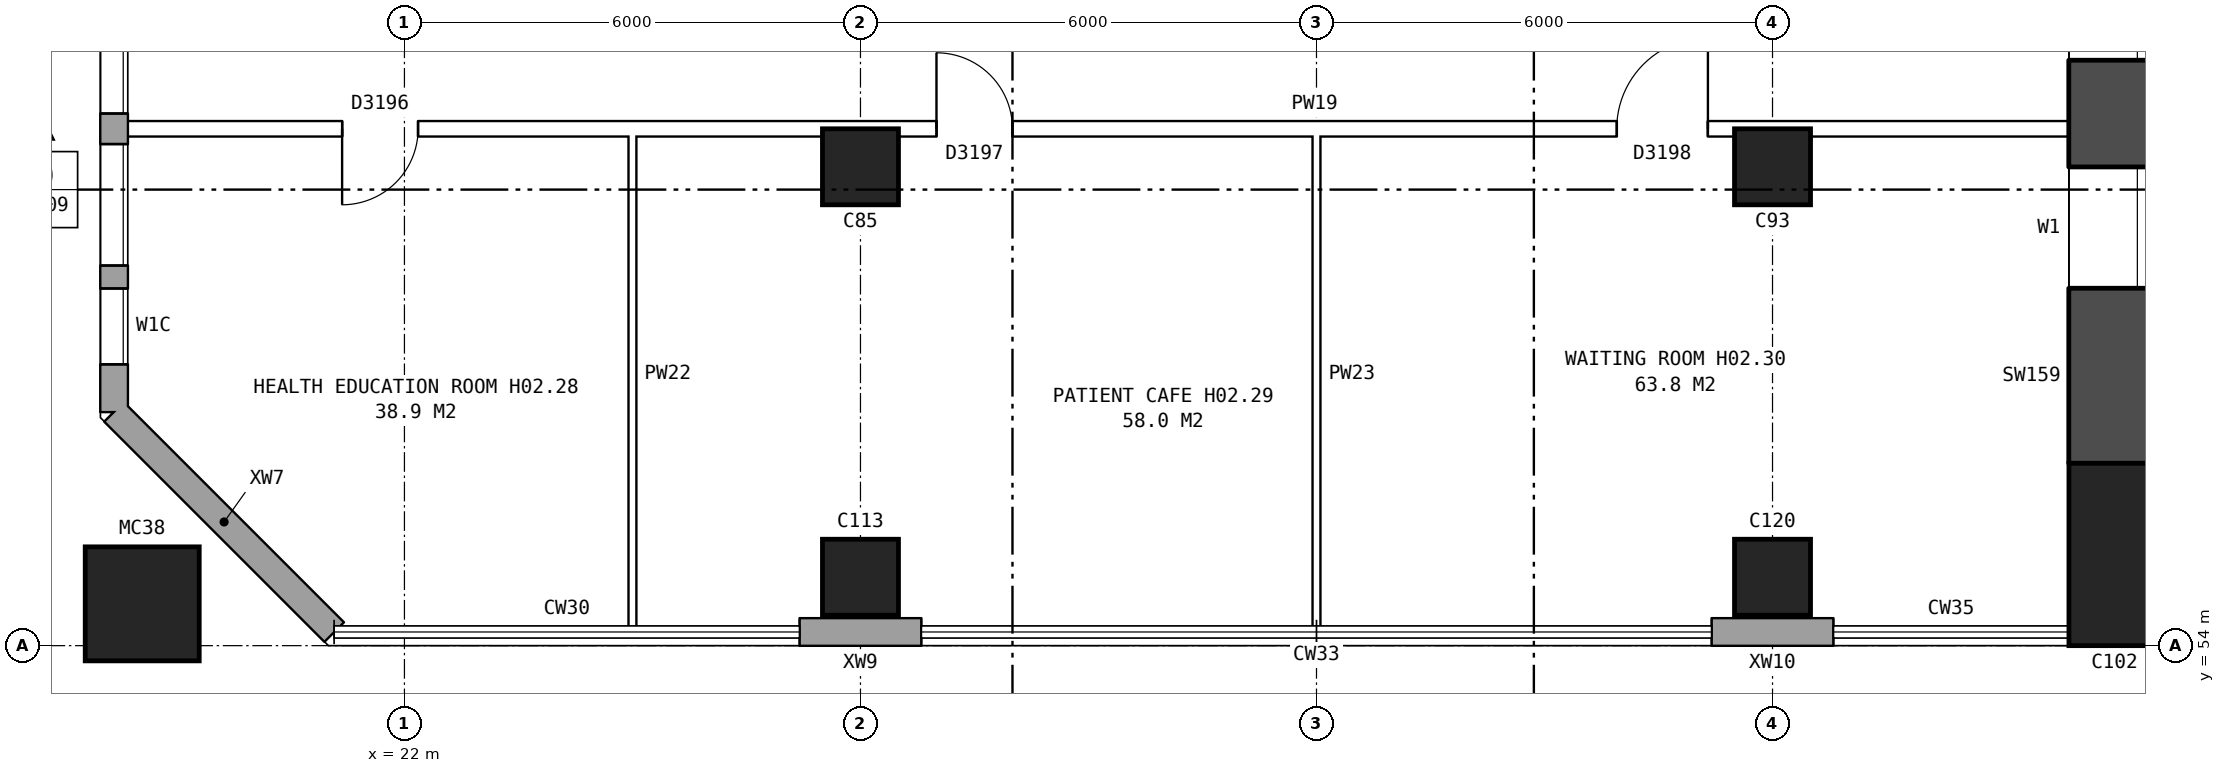
"""IFC4 building model, lengths in metres.
Left out: names, types, materials, properties, quantities, classifications, styles, units other than length and angle.
Written with IfcOpenShell. Run it as: python <this file> out.ifc"""

import sys

from ifc_helpers import new_model, si_unit, direction, frame, frame_2d, origin, origin_2d, place, context, subcontext, project, spatial, rectangle, hollow_rectangle, extrude, element, fill, save


model = new_model("IFC4")
c1 = context("Model", 3, precision=1e-05, world=origin(), true_north=direction((0.0, 1.0)))
c2 = subcontext(c1, "Body", "Model", "MODEL_VIEW")
j1 = project(units=[si_unit("LENGTHUNIT", "METRE"), si_unit("PLANEANGLEUNIT", "RADIAN")], contexts=[c1])
p1 = place(None, origin())
s1 = spatial("IfcSite", under=j1, at=p1, CompositionType="ELEMENT")
p2 = place(p1, origin())
s2 = spatial("IfcBuilding", under=s1, at=p2, CompositionType="ELEMENT")
p3 = place(p2, frame((0.0, 0.0, 10.1)))
s3 = spatial("IfcBuildingStorey", under=s2, at=p3, CompositionType="ELEMENT", Elevation=10.1)
p4 = place(p3, frame((44.5, 55.2, -0.3), z_axis=(0.0, 0.0, 1.0), x_axis=(1.0, 0.0, 0.0)))
e1 = element("IfcColumn", 1, at=p4, inside=s3, PredefinedType="COLUMN", context=c2, shape_type="SweptSolid", body=[
    extrude(rectangle(XDim=1.2, YDim=2.4, at=origin_2d()), origin(), (0.0, 0.0, 1.0), 4.4),
])
p5 = place(p3, frame((44.5, 56.4, -0.3), z_axis=(0.0, 0.0, 1.0), x_axis=(0.0, 1.0, 0.0)))
e2 = element("IfcWall", 2, at=p5, inside=s3, PredefinedType="SHEAR", context=c2, shape_type="SweptSolid", body=[
    extrude(rectangle(XDim=27.2, YDim=1.2, at=frame_2d((13.6, 0.0))), origin(), (0.0, 0.0, 1.0), 4.4),
])
p6 = place(p5, frame((2.3, 0.0, 0.8)))
e3 = element("IfcOpeningElement", 3, at=p6, cuts=e2, PredefinedType="OPENING", context=c2, shape_type="SweptSolid", body=[
    extrude(rectangle(XDim=1.6, YDim=1.8, at=frame_2d((0.8, 0.9))), frame((0.0, 0.61, 0.0), z_axis=(0.0, -1.0, 0.0), x_axis=(1.0, 0.0, 0.0)), (0.0, 0.0, 1.0), 1.22),
])
p7 = place(p5, frame((5.3, 0.0, 0.8)))
e4 = element("IfcOpeningElement", 4, at=p7, cuts=e2, PredefinedType="OPENING", context=c2, shape_type="SweptSolid", body=[
    extrude(rectangle(XDim=1.6, YDim=1.8, at=frame_2d((0.8, 0.9))), frame((0.0, 0.61, 0.0), z_axis=(0.0, -1.0, 0.0), x_axis=(1.0, 0.0, 0.0)), (0.0, 0.0, 1.0), 1.22),
])
p8 = place(p5, frame((8.3, 0.0, 0.8)))
e5 = element("IfcOpeningElement", 5, at=p8, cuts=e2, PredefinedType="OPENING", context=c2, shape_type="SweptSolid", body=[
    extrude(rectangle(XDim=1.6, YDim=1.8, at=frame_2d((0.8, 0.9))), frame((0.0, 0.61, 0.0), z_axis=(0.0, -1.0, 0.0), x_axis=(1.0, 0.0, 0.0)), (0.0, 0.0, 1.0), 1.22),
])
p9 = place(p5, frame((11.3, 0.0, 0.8)))
e6 = element("IfcOpeningElement", 6, at=p9, cuts=e2, PredefinedType="OPENING", context=c2, shape_type="SweptSolid", body=[
    extrude(rectangle(XDim=1.6, YDim=1.8, at=frame_2d((0.8, 0.9))), frame((0.0, 0.61, 0.0), z_axis=(0.0, -1.0, 0.0), x_axis=(1.0, 0.0, 0.0)), (0.0, 0.0, 1.0), 1.22),
])
p10 = place(p5, frame((14.3, 0.0, 0.8)))
e7 = element("IfcOpeningElement", 7, at=p10, cuts=e2, PredefinedType="OPENING", context=c2, shape_type="SweptSolid", body=[
    extrude(rectangle(XDim=1.6, YDim=1.8, at=frame_2d((0.8, 0.9))), frame((0.0, 0.61, 0.0), z_axis=(0.0, -1.0, 0.0), x_axis=(1.0, 0.0, 0.0)), (0.0, 0.0, 1.0), 1.22),
])
p11 = place(p5, frame((17.3, 0.0, 0.8)))
e8 = element("IfcOpeningElement", 8, at=p11, cuts=e2, PredefinedType="OPENING", context=c2, shape_type="SweptSolid", body=[
    extrude(rectangle(XDim=1.6, YDim=1.8, at=frame_2d((0.8, 0.9))), frame((0.0, 0.61, 0.0), z_axis=(0.0, -1.0, 0.0), x_axis=(1.0, 0.0, 0.0)), (0.0, 0.0, 1.0), 1.22),
])
p12 = place(p5, frame((20.3, 0.0, 0.8)))
e9 = element("IfcOpeningElement", 9, at=p12, cuts=e2, PredefinedType="OPENING", context=c2, shape_type="SweptSolid", body=[
    extrude(rectangle(XDim=1.6, YDim=1.8, at=frame_2d((0.8, 0.9))), frame((0.0, 0.61, 0.0), z_axis=(0.0, -1.0, 0.0), x_axis=(1.0, 0.0, 0.0)), (0.0, 0.0, 1.0), 1.22),
])
p13 = place(p5, frame((23.3, 0.0, 0.8)))
e10 = element("IfcOpeningElement", 10, at=p13, cuts=e2, PredefinedType="OPENING", context=c2, shape_type="SweptSolid", body=[
    extrude(rectangle(XDim=1.6, YDim=1.8, at=frame_2d((0.8, 0.9))), frame((0.0, 0.61, 0.0), z_axis=(0.0, -1.0, 0.0), x_axis=(1.0, 0.0, 0.0)), (0.0, 0.0, 1.0), 1.22),
])
for number, where, z_axis, x_axis in (
    (11, (28.0, 54.9, 0.0), (0.0, 0.0, 1.0), (1.0, 0.0, 0.0)),
    (12, (28.0, 60.3, 0.0), (0.0, 0.0, 1.0), (1.0, 0.0, 0.0)),
    (13, (40.0, 54.9, 0.0), (0.0, 0.0, 1.0), (1.0, 0.0, 0.0)),
    (14, (40.0, 60.3, 0.0), (0.0, 0.0, 1.0), (1.0, 0.0, 0.0)),
):
    element("IfcColumn", number, at=place(p3, frame(where, z_axis=z_axis, x_axis=x_axis)), inside=s3, PredefinedType="COLUMN", context=c2, shape_type="SweptSolid", body=[
        extrude(rectangle(XDim=1.0, YDim=1.0, at=origin_2d()), origin(), (0.0, 0.0, 1.0), 4.3),
    ])
p14 = place(p3, frame((18.55, 54.55, 0.0), z_axis=(0.0, 0.0, 1.0), x_axis=(1.0, 0.0, 0.0)))
e15 = element("IfcColumn", 15, at=p14, inside=s3, PredefinedType="COLUMN", context=c2, shape_type="SweptSolid", body=[
    extrude(hollow_rectangle(XDim=1.5, YDim=1.5, WallThickness=0.08, at=origin_2d()), origin(), (0.0, 0.0, 1.0), 4.6),
])
p15 = place(p3, frame((18.18, 57.075, 0.0), z_axis=(0.0, 0.0, 1.0), x_axis=(0.707106781187, -0.707106781187, 0.0)))
e16 = element("IfcWall", 16, at=p15, inside=s3, PredefinedType="STANDARD", context=c2, shape_type="SweptSolid", body=[
    extrude(rectangle(XDim=4.094, YDim=0.36, at=frame_2d((2.047, 0.0))), origin(), (0.0, 0.0, 1.0), 4.3),
])
for number, where, z_axis, x_axis in (
    (17, (27.2, 54.18, 0.0), (0.0, 0.0, 1.0), (1.0, 0.0, 0.0)),
    (18, (39.2, 54.18, 0.0), (0.0, 0.0, 1.0), (1.0, 0.0, 0.0)),
):
    element("IfcWall", number, at=place(p3, frame(where, z_axis=z_axis, x_axis=x_axis)), inside=s3, PredefinedType="STANDARD", context=c2, shape_type="SweptSolid", body=[
        extrude(rectangle(XDim=1.6, YDim=0.36, at=frame_2d((0.8, 0.0))), origin(), (0.0, 0.0, 1.0), 4.3),
    ])
p16 = place(p3, frame((18.18, 82.925, 0.0), z_axis=(0.0, 0.0, 1.0), x_axis=(0.0, -1.0, 0.0)))
e19 = element("IfcWall", 19, at=p16, inside=s3, PredefinedType="STANDARD", context=c2, shape_type="SweptSolid", body=[
    extrude(rectangle(XDim=25.851, YDim=0.36, at=frame_2d((12.925, 0.0))), origin(), (0.0, 0.0, 1.0), 4.3),
])
p17 = place(p16, frame((0.3, 0.0, 0.8)))
e20 = element("IfcOpeningElement", 20, at=p17, cuts=e19, PredefinedType="OPENING", context=c2, shape_type="SweptSolid", body=[
    extrude(rectangle(XDim=1.4, YDim=1.8, at=frame_2d((0.7, 0.9))), frame((0.0, 0.19, 0.0), z_axis=(0.0, -1.0, 0.0), x_axis=(1.0, 0.0, 0.0)), (0.0, 0.0, 1.0), 0.38),
])
p18 = place(p16, frame((3.925, 0.0, 0.8)))
e21 = element("IfcOpeningElement", 21, at=p18, cuts=e19, PredefinedType="OPENING", context=c2, shape_type="SweptSolid", body=[
    extrude(rectangle(XDim=1.2, YDim=0.9, at=frame_2d((0.6, 0.45))), frame((0.0, 0.19, 0.0), z_axis=(0.0, -1.0, 0.0), x_axis=(1.0, 0.0, 0.0)), (0.0, 0.0, 1.0), 0.38),
])
p19 = place(p16, frame((7.375, 0.0, 1.7)))
e22 = element("IfcOpeningElement", 22, at=p19, cuts=e19, PredefinedType="OPENING", context=c2, shape_type="SweptSolid", body=[
    extrude(rectangle(XDim=1.0, YDim=0.9, at=frame_2d((0.5, 0.45))), frame((0.0, 0.19, 0.0), z_axis=(0.0, -1.0, 0.0), x_axis=(1.0, 0.0, 0.0)), (0.0, 0.0, 1.0), 0.38),
])
p20 = place(p16, frame((10.625, 0.0, 0.8)))
e23 = element("IfcOpeningElement", 23, at=p20, cuts=e19, PredefinedType="OPENING", context=c2, shape_type="SweptSolid", body=[
    extrude(rectangle(XDim=1.6, YDim=1.8, at=frame_2d((0.8, 0.9))), frame((0.0, 0.19, 0.0), z_axis=(0.0, -1.0, 0.0), x_axis=(1.0, 0.0, 0.0)), (0.0, 0.0, 1.0), 0.38),
])
p21 = place(p16, frame((13.625, 0.0, 0.8)))
e24 = element("IfcOpeningElement", 24, at=p21, cuts=e19, PredefinedType="OPENING", context=c2, shape_type="SweptSolid", body=[
    extrude(rectangle(XDim=1.6, YDim=1.8, at=frame_2d((0.8, 0.9))), frame((0.0, 0.19, 0.0), z_axis=(0.0, -1.0, 0.0), x_axis=(1.0, 0.0, 0.0)), (0.0, 0.0, 1.0), 0.38),
])
p22 = place(p16, frame((15.525, 0.0, 1.4)))
e25 = element("IfcOpeningElement", 25, at=p22, cuts=e19, PredefinedType="OPENING", context=c2, shape_type="SweptSolid", body=[
    extrude(rectangle(XDim=1.6, YDim=1.2, at=frame_2d((0.8, 0.6))), frame((0.0, 0.19, 0.0), z_axis=(0.0, -1.0, 0.0), x_axis=(1.0, 0.0, 0.0)), (0.0, 0.0, 1.0), 0.38),
])
p23 = place(p16, frame((20.725, 0.0, 0.8)))
e26 = element("IfcOpeningElement", 26, at=p23, cuts=e19, PredefinedType="OPENING", context=c2, shape_type="SweptSolid", body=[
    extrude(rectangle(XDim=1.2, YDim=0.9, at=frame_2d((0.6, 0.45))), frame((0.0, 0.19, 0.0), z_axis=(0.0, -1.0, 0.0), x_axis=(1.0, 0.0, 0.0)), (0.0, 0.0, 1.0), 0.38),
])
p24 = place(p16, frame((22.325, 0.0, 0.8)))
e27 = element("IfcOpeningElement", 27, at=p24, cuts=e19, PredefinedType="OPENING", context=c2, shape_type="SweptSolid", body=[
    extrude(rectangle(XDim=1.6, YDim=1.2, at=frame_2d((0.8, 0.6))), frame((0.0, 0.19, 0.0), z_axis=(0.0, -1.0, 0.0), x_axis=(1.0, 0.0, 0.0)), (0.0, 0.0, 1.0), 0.38),
])
p25 = place(p16, frame((2.0, 0.0, 0.8)))
e28 = element("IfcOpeningElement", 28, at=p25, cuts=e19, PredefinedType="OPENING", context=c2, shape_type="SweptSolid", body=[
    extrude(rectangle(XDim=0.8, YDim=1.5, at=frame_2d((0.4, 0.75))), frame((0.0, 0.19, 0.0), z_axis=(0.0, -1.0, 0.0), x_axis=(1.0, 0.0, 0.0)), (0.0, 0.0, 1.0), 0.38),
])
p26 = place(p16, frame((8.675, 0.0, 1.4)))
e29 = element("IfcOpeningElement", 29, at=p26, cuts=e19, PredefinedType="OPENING", context=c2, shape_type="SweptSolid", body=[
    extrude(rectangle(XDim=1.6, YDim=1.2, at=frame_2d((0.8, 0.6))), frame((0.0, 0.19, 0.0), z_axis=(0.0, -1.0, 0.0), x_axis=(1.0, 0.0, 0.0)), (0.0, 0.0, 1.0), 0.38),
])
p27 = place(p16, frame((17.425, 0.0, 1.7)))
e30 = element("IfcOpeningElement", 30, at=p27, cuts=e19, PredefinedType="OPENING", context=c2, shape_type="SweptSolid", body=[
    extrude(rectangle(XDim=1.0, YDim=0.9, at=frame_2d((0.5, 0.45))), frame((0.0, 0.19, 0.0), z_axis=(0.0, -1.0, 0.0), x_axis=(1.0, 0.0, 0.0)), (0.0, 0.0, 1.0), 0.38),
])
p28 = place(p16, frame((24.225, 0.0, 0.8)))
e31 = element("IfcOpeningElement", 31, at=p28, cuts=e19, PredefinedType="OPENING", context=c2, shape_type="SweptSolid", body=[
    extrude(rectangle(XDim=1.0, YDim=1.8, at=frame_2d((0.5, 0.9))), frame((0.0, 0.19, 0.0), z_axis=(0.0, -1.0, 0.0), x_axis=(1.0, 0.0, 0.0)), (0.0, 0.0, 1.0), 0.38),
])
p29 = place(p3, frame((18.24, 60.8, 0.0), z_axis=(0.0, 0.0, 1.0), x_axis=(1.0, 0.0, 0.0)))
e32 = element("IfcWall", 32, at=p29, inside=s3, PredefinedType="PARTITIONING", context=c2, shape_type="SweptSolid", body=[
    extrude(rectangle(XDim=25.78, YDim=0.2, at=frame_2d((12.89, 0.0))), origin(), (0.0, 0.0, 1.0), 4.3),
])
p30 = place(p29, frame((2.94, 0.0, 0.0)))
e33 = element("IfcOpeningElement", 33, at=p30, cuts=e32, PredefinedType="OPENING", context=c2, shape_type="SweptSolid", body=[
    extrude(rectangle(XDim=1.0, YDim=2.1, at=frame_2d((0.5, 1.05))), frame((0.0, 0.11, 0.0), z_axis=(0.0, -1.0, 0.0), x_axis=(1.0, 0.0, 0.0)), (0.0, 0.0, 1.0), 0.22),
])
p31 = place(p29, frame((10.76, 0.0, 0.0)))
e34 = element("IfcOpeningElement", 34, at=p31, cuts=e32, PredefinedType="OPENING", context=c2, shape_type="SweptSolid", body=[
    extrude(rectangle(XDim=1.0, YDim=2.1, at=frame_2d((0.5, 1.05))), frame((0.0, 0.11, 0.0), z_axis=(0.0, -1.0, 0.0), x_axis=(1.0, 0.0, 0.0)), (0.0, 0.0, 1.0), 0.22),
])
p32 = place(p29, frame((19.71, 0.0, 0.0)))
e35 = element("IfcOpeningElement", 35, at=p32, cuts=e32, PredefinedType="OPENING", context=c2, shape_type="SweptSolid", body=[
    extrude(rectangle(XDim=1.2, YDim=2.1, at=frame_2d((0.6, 1.05))), frame((0.0, 0.11, 0.0), z_axis=(0.0, -1.0, 0.0), x_axis=(1.0, 0.0, 0.0)), (0.0, 0.0, 1.0), 0.22),
])
for number, where, z_axis, x_axis in (
    (36, (25.0, 54.24, 0.0), (0.0, 0.0, 1.0), (0.0, 1.0, 0.0)),
    (37, (34.0, 54.24, 0.0), (0.0, 0.0, 1.0), (0.0, 1.0, 0.0)),
):
    element("IfcWall", number, at=place(p3, frame(where, z_axis=z_axis, x_axis=x_axis)), inside=s3, PredefinedType="PARTITIONING", context=c2, shape_type="SweptSolid", body=[
        extrude(rectangle(XDim=6.66, YDim=0.1, at=frame_2d((3.33, 0.0))), origin(), (0.0, 0.0, 1.0), 4.3),
    ])
p33 = place(p23, origin())
e38 = element("IfcWindow", 38, at=p33, inside=s3, PartitioningType="SINGLE_PANEL", PredefinedType="WINDOW", context=c2, shape_type="SweptSolid", body=[
    extrude(rectangle(XDim=1.2, YDim=0.9, at=frame_2d((0.6, 0.45))), frame((0.0, 0.15, 0.0), z_axis=(0.0, -1.0, 0.0), x_axis=(1.0, 0.0, 0.0)), (0.0, 0.0, 1.0), 0.06),
])
fill(e26, e38)
p34 = place(p24, origin())
e39 = element("IfcWindow", 39, at=p34, inside=s3, PartitioningType="SINGLE_PANEL", PredefinedType="WINDOW", context=c2, shape_type="SweptSolid", body=[
    extrude(rectangle(XDim=1.6, YDim=1.2, at=frame_2d((0.8, 0.6))), frame((0.0, 0.15, 0.0), z_axis=(0.0, -1.0, 0.0), x_axis=(1.0, 0.0, 0.0)), (0.0, 0.0, 1.0), 0.06),
])
fill(e27, e39)
p35 = place(p6, origin())
e40 = element("IfcWindow", 40, at=p35, inside=s3, PartitioningType="SINGLE_PANEL", PredefinedType="WINDOW", context=c2, shape_type="SweptSolid", body=[
    extrude(rectangle(XDim=1.6, YDim=1.8, at=frame_2d((0.8, 0.9))), frame((0.0, -0.27, 0.0), z_axis=(0.0, -1.0, 0.0), x_axis=(1.0, 0.0, 0.0)), (0.0, 0.0, 1.0), 0.06),
])
fill(e3, e40)
p36 = place(p7, origin())
e41 = element("IfcWindow", 41, at=p36, inside=s3, PartitioningType="SINGLE_PANEL", PredefinedType="WINDOW", context=c2, shape_type="SweptSolid", body=[
    extrude(rectangle(XDim=1.6, YDim=1.8, at=frame_2d((0.8, 0.9))), frame((0.0, -0.27, 0.0), z_axis=(0.0, -1.0, 0.0), x_axis=(1.0, 0.0, 0.0)), (0.0, 0.0, 1.0), 0.06),
])
fill(e4, e41)
p37 = place(p30, frame((1.0, 0.0, 0.0), z_axis=(0.0, 0.0, 1.0), x_axis=(-1.0, 0.0, 0.0)))
e42 = element("IfcDoor", 42, at=p37, inside=s3, OperationType="SINGLE_SWING_RIGHT", PredefinedType="DOOR", context=c2, shape_type="SweptSolid", body=[
    extrude(rectangle(XDim=1.0, YDim=2.1, at=frame_2d((0.5, 1.05))), frame((0.0, 0.025, 0.0), z_axis=(0.0, -1.0, 0.0), x_axis=(1.0, 0.0, 0.0)), (0.0, 0.0, 1.0), 0.05),
])
fill(e33, e42)
p38 = place(p31, origin())
e43 = element("IfcDoor", 43, at=p38, inside=s3, OperationType="SINGLE_SWING_LEFT", PredefinedType="DOOR", context=c2, shape_type="SweptSolid", body=[
    extrude(rectangle(XDim=1.0, YDim=2.1, at=frame_2d((0.5, 1.05))), frame((0.0, 0.025, 0.0), z_axis=(0.0, -1.0, 0.0), x_axis=(1.0, 0.0, 0.0)), (0.0, 0.0, 1.0), 0.05),
])
fill(e34, e43)
p39 = place(p32, origin())
e44 = element("IfcDoor", 44, at=p39, inside=s3, OperationType="SINGLE_SWING_RIGHT", PredefinedType="DOOR", context=c2, shape_type="SweptSolid", body=[
    extrude(rectangle(XDim=1.2, YDim=2.1, at=frame_2d((0.6, 1.05))), frame((0.0, 0.025, 0.0), z_axis=(0.0, -1.0, 0.0), x_axis=(1.0, 0.0, 0.0)), (0.0, 0.0, 1.0), 0.05),
])
fill(e35, e44)
p40 = place(p28, origin())
e45 = element("IfcWindow", 45, at=p40, inside=s3, PartitioningType="SINGLE_PANEL", PredefinedType="WINDOW", context=c2, shape_type="SweptSolid", body=[
    extrude(rectangle(XDim=1.0, YDim=1.8, at=frame_2d((0.5, 0.9))), frame((0.0, 0.15, 0.0), z_axis=(0.0, -1.0, 0.0), x_axis=(1.0, 0.0, 0.0)), (0.0, 0.0, 1.0), 0.06),
])
fill(e31, e45)
save(model, sys.argv[1])
